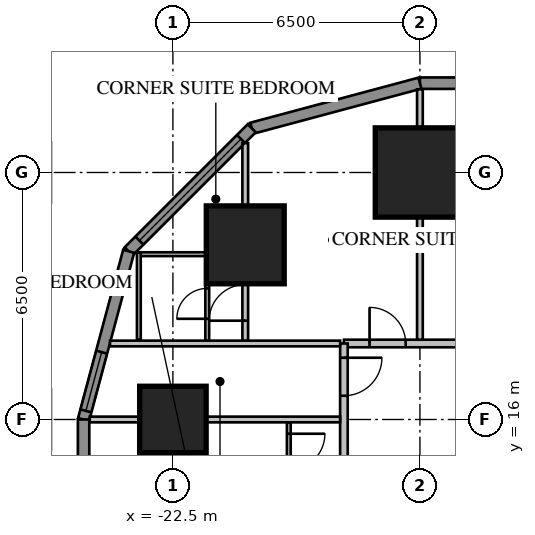
"""IFC4 building model, lengths in metres.
Left out: names, types, materials, properties, quantities, classifications, styles, units other than length and angle.
Written with IfcOpenShell. Run it as: python <this file> out.ifc"""

import sys

from ifc_helpers import new_model, si_unit, direction, frame, frame_2d, origin, origin_2d, place, context, subcontext, project, spatial, rectangle, extrude, element, fill, save


model = new_model("IFC4")
c1 = context("Model", 3, precision=1e-05, world=origin(), true_north=direction((0.0, 1.0)))
c2 = subcontext(c1, "Body", "Model", "MODEL_VIEW")
j1 = project(units=[si_unit("LENGTHUNIT", "METRE"), si_unit("PLANEANGLEUNIT", "RADIAN")], contexts=[c1])
p1 = place(None, origin())
s1 = spatial("IfcSite", under=j1, at=p1, CompositionType="ELEMENT")
p2 = place(p1, origin())
s2 = spatial("IfcBuilding", under=s1, at=p2, CompositionType="ELEMENT")
p3 = place(p2, frame((0.0, 0.0, 19.85)))
s3 = spatial("IfcBuildingStorey", under=s2, at=p3, CompositionType="ELEMENT", Elevation=19.85)
p4 = place(p3, frame((-16.0, 22.5, 0.0), z_axis=(0.0, 0.0, 1.0), x_axis=(1.0, 0.0, 0.0)))
e1 = element("IfcColumn", 1, at=p4, inside=s3, PredefinedType="COLUMN", context=c2, shape_type="SweptSolid", body=[
    extrude(rectangle(XDim=2.35, YDim=2.35, at=origin_2d()), origin(), (0.0, 0.0, 1.0), 3.85),
])
p5 = place(p3, frame((-20.596, 20.596, 0.0), z_axis=(0.0, 0.0, 1.0), x_axis=(1.0, 0.0, 0.0)))
e2 = element("IfcColumn", 2, at=p5, inside=s3, PredefinedType="COLUMN", context=c2, shape_type="SweptSolid", body=[
    extrude(rectangle(XDim=2.05, YDim=2.05, at=origin_2d()), origin(), (0.0, 0.0, 1.0), 3.85),
])
p6 = place(p3, frame((-22.5, 16.0, 0.0), z_axis=(0.0, 0.0, 1.0), x_axis=(1.0, 0.0, 0.0)))
e3 = element("IfcColumn", 3, at=p6, inside=s3, PredefinedType="COLUMN", context=c2, shape_type="SweptSolid", body=[
    extrude(rectangle(XDim=1.75, YDim=1.75, at=origin_2d()), origin(), (0.0, 0.0, 1.0), 3.85),
])
p7 = place(p3, frame((16.0, 24.85, 0.0), z_axis=(0.0, 0.0, 1.0), x_axis=(-1.0, 0.0, 0.0)))
e4 = element("IfcWall", 4, at=p7, inside=s3, PredefinedType="SOLIDWALL", context=c2, shape_type="SweptSolid", body=[
    extrude(rectangle(XDim=32.0, YDim=0.3, at=frame_2d((16.0, 0.0))), origin(), (0.0, 0.0, 1.0), 3.65),
])
p8 = place(p7, frame((1.2, 0.0, 0.75)))
e5 = element("IfcOpeningElement", 5, at=p8, cuts=e4, PredefinedType="OPENING", context=c2, shape_type="SweptSolid", body=[
    extrude(rectangle(XDim=1.6, YDim=1.8, at=frame_2d((0.8, 0.9))), frame((0.0, 0.17, 0.0), z_axis=(0.0, -1.0, 0.0), x_axis=(1.0, 0.0, 0.0)), (0.0, 0.0, 1.0), 0.34),
])
p9 = place(p7, frame((5.2, 0.0, 0.75)))
e6 = element("IfcOpeningElement", 6, at=p9, cuts=e4, PredefinedType="OPENING", context=c2, shape_type="SweptSolid", body=[
    extrude(rectangle(XDim=1.6, YDim=1.8, at=frame_2d((0.8, 0.9))), frame((0.0, 0.17, 0.0), z_axis=(0.0, -1.0, 0.0), x_axis=(1.0, 0.0, 0.0)), (0.0, 0.0, 1.0), 0.34),
])
p10 = place(p7, frame((17.2, 0.0, 0.75)))
e7 = element("IfcOpeningElement", 7, at=p10, cuts=e4, PredefinedType="OPENING", context=c2, shape_type="SweptSolid", body=[
    extrude(rectangle(XDim=1.6, YDim=1.8, at=frame_2d((0.8, 0.9))), frame((0.0, 0.17, 0.0), z_axis=(0.0, -1.0, 0.0), x_axis=(1.0, 0.0, 0.0)), (0.0, 0.0, 1.0), 0.34),
])
p11 = place(p7, frame((21.2, 0.0, 0.75)))
e8 = element("IfcOpeningElement", 8, at=p11, cuts=e4, PredefinedType="OPENING", context=c2, shape_type="SweptSolid", body=[
    extrude(rectangle(XDim=1.6, YDim=1.8, at=frame_2d((0.8, 0.9))), frame((0.0, 0.17, 0.0), z_axis=(0.0, -1.0, 0.0), x_axis=(1.0, 0.0, 0.0)), (0.0, 0.0, 1.0), 0.34),
])
p12 = place(p7, frame((25.2, 0.0, 0.75)))
e9 = element("IfcOpeningElement", 9, at=p12, cuts=e4, PredefinedType="OPENING", context=c2, shape_type="SweptSolid", body=[
    extrude(rectangle(XDim=1.6, YDim=1.8, at=frame_2d((0.8, 0.9))), frame((0.0, 0.17, 0.0), z_axis=(0.0, -1.0, 0.0), x_axis=(1.0, 0.0, 0.0)), (0.0, 0.0, 1.0), 0.34),
])
p13 = place(p7, frame((29.2, 0.0, 0.75)))
e10 = element("IfcOpeningElement", 10, at=p13, cuts=e4, PredefinedType="OPENING", context=c2, shape_type="SweptSolid", body=[
    extrude(rectangle(XDim=1.6, YDim=1.8, at=frame_2d((0.8, 0.9))), frame((0.0, 0.17, 0.0), z_axis=(0.0, -1.0, 0.0), x_axis=(1.0, 0.0, 0.0)), (0.0, 0.0, 1.0), 0.34),
])
p14 = place(p7, frame((8.8, 0.0, 0.75)))
e11 = element("IfcOpeningElement", 11, at=p14, cuts=e4, PredefinedType="OPENING", context=c2, shape_type="SweptSolid", body=[
    extrude(rectangle(XDim=2.4, YDim=1.8, at=frame_2d((1.2, 0.9))), frame((0.0, 0.17, 0.0), z_axis=(0.0, -1.0, 0.0), x_axis=(1.0, 0.0, 0.0)), (0.0, 0.0, 1.0), 0.34),
])
p15 = place(p7, frame((13.812, 0.0, 0.0)))
e12 = element("IfcOpeningElement", 12, at=p15, cuts=e4, PredefinedType="OPENING", context=c2, shape_type="SweptSolid", body=[
    extrude(rectangle(XDim=1.0, YDim=2.4, at=frame_2d((0.5, 1.2))), frame((0.0, 0.17, 0.0), z_axis=(0.0, -1.0, 0.0), x_axis=(1.0, 0.0, 0.0)), (0.0, 0.0, 1.0), 0.34),
])
p16 = place(p3, frame((-16.0, 24.85, 0.0), z_axis=(0.0, 0.0, 1.0), x_axis=(-0.965920218567, -0.258839972501, 0.0)))
e13 = element("IfcWall", 13, at=p16, inside=s3, PredefinedType="SOLIDWALL", context=c2, shape_type="SweptSolid", body=[
    extrude(rectangle(XDim=4.581, YDim=0.3, at=frame_2d((2.291, 0.0))), origin(), (0.0, 0.0, 1.0), 3.65),
])
p17 = place(p3, frame((-20.425, 23.664, 0.0), z_axis=(0.0, 0.0, 1.0), x_axis=(-0.707106781187, -0.707106781187, 0.0)))
e14 = element("IfcWall", 14, at=p17, inside=s3, PredefinedType="SOLIDWALL", context=c2, shape_type="SweptSolid", body=[
    extrude(rectangle(XDim=4.581, YDim=0.3, at=frame_2d((2.291, 0.0))), origin(), (0.0, 0.0, 1.0), 3.65),
])
p18 = place(p17, frame((0.4, 0.0, 0.75)))
e15 = element("IfcOpeningElement", 15, at=p18, cuts=e14, PredefinedType="OPENING", context=c2, shape_type="SweptSolid", body=[
    extrude(rectangle(XDim=3.781, YDim=1.8, at=frame_2d((1.891, 0.9))), frame((0.0, 0.17, 0.0), z_axis=(0.0, -1.0, 0.0), x_axis=(1.0, 0.0, 0.0)), (0.0, 0.0, 1.0), 0.34),
])
p19 = place(p3, frame((-23.664, 20.425, 0.0), z_axis=(0.0, 0.0, 1.0), x_axis=(-0.258839972501, -0.965920218567, 0.0)))
e16 = element("IfcWall", 16, at=p19, inside=s3, PredefinedType="SOLIDWALL", context=c2, shape_type="SweptSolid", body=[
    extrude(rectangle(XDim=4.581, YDim=0.3, at=frame_2d((2.291, 0.0))), origin(), (0.0, 0.0, 1.0), 3.65),
])
p20 = place(p19, frame((2.746, 0.0, 0.75)))
e17 = element("IfcOpeningElement", 17, at=p20, cuts=e16, PredefinedType="OPENING", context=c2, shape_type="SweptSolid", body=[
    extrude(rectangle(XDim=1.6, YDim=1.8, at=frame_2d((0.8, 0.9))), frame((0.0, 0.17, 0.0), z_axis=(0.0, -1.0, 0.0), x_axis=(1.0, 0.0, 0.0)), (0.0, 0.0, 1.0), 0.34),
])
p21 = place(p3, frame((-24.85, 16.0, 0.0), z_axis=(0.0, 0.0, 1.0), x_axis=(0.0, -1.0, 0.0)))
e18 = element("IfcWall", 18, at=p21, inside=s3, PredefinedType="SOLIDWALL", context=c2, shape_type="SweptSolid", body=[
    extrude(rectangle(XDim=32.0, YDim=0.3, at=frame_2d((16.0, 0.0))), origin(), (0.0, 0.0, 1.0), 3.65),
])
p22 = place(p21, frame((1.2, 0.0, 0.75)))
e19 = element("IfcOpeningElement", 19, at=p22, cuts=e18, PredefinedType="OPENING", context=c2, shape_type="SweptSolid", body=[
    extrude(rectangle(XDim=1.6, YDim=1.8, at=frame_2d((0.8, 0.9))), frame((0.0, 0.17, 0.0), z_axis=(0.0, -1.0, 0.0), x_axis=(1.0, 0.0, 0.0)), (0.0, 0.0, 1.0), 0.34),
])
p23 = place(p21, frame((5.2, 0.0, 0.75)))
e20 = element("IfcOpeningElement", 20, at=p23, cuts=e18, PredefinedType="OPENING", context=c2, shape_type="SweptSolid", body=[
    extrude(rectangle(XDim=1.6, YDim=1.8, at=frame_2d((0.8, 0.9))), frame((0.0, 0.17, 0.0), z_axis=(0.0, -1.0, 0.0), x_axis=(1.0, 0.0, 0.0)), (0.0, 0.0, 1.0), 0.34),
])
p24 = place(p21, frame((17.2, 0.0, 0.75)))
e21 = element("IfcOpeningElement", 21, at=p24, cuts=e18, PredefinedType="OPENING", context=c2, shape_type="SweptSolid", body=[
    extrude(rectangle(XDim=1.6, YDim=1.8, at=frame_2d((0.8, 0.9))), frame((0.0, 0.17, 0.0), z_axis=(0.0, -1.0, 0.0), x_axis=(1.0, 0.0, 0.0)), (0.0, 0.0, 1.0), 0.34),
])
p25 = place(p21, frame((21.2, 0.0, 0.75)))
e22 = element("IfcOpeningElement", 22, at=p25, cuts=e18, PredefinedType="OPENING", context=c2, shape_type="SweptSolid", body=[
    extrude(rectangle(XDim=1.6, YDim=1.8, at=frame_2d((0.8, 0.9))), frame((0.0, 0.17, 0.0), z_axis=(0.0, -1.0, 0.0), x_axis=(1.0, 0.0, 0.0)), (0.0, 0.0, 1.0), 0.34),
])
p26 = place(p21, frame((25.2, 0.0, 0.75)))
e23 = element("IfcOpeningElement", 23, at=p26, cuts=e18, PredefinedType="OPENING", context=c2, shape_type="SweptSolid", body=[
    extrude(rectangle(XDim=1.6, YDim=1.8, at=frame_2d((0.8, 0.9))), frame((0.0, 0.17, 0.0), z_axis=(0.0, -1.0, 0.0), x_axis=(1.0, 0.0, 0.0)), (0.0, 0.0, 1.0), 0.34),
])
p27 = place(p21, frame((29.2, 0.0, 0.75)))
e24 = element("IfcOpeningElement", 24, at=p27, cuts=e18, PredefinedType="OPENING", context=c2, shape_type="SweptSolid", body=[
    extrude(rectangle(XDim=1.6, YDim=1.8, at=frame_2d((0.8, 0.9))), frame((0.0, 0.17, 0.0), z_axis=(0.0, -1.0, 0.0), x_axis=(1.0, 0.0, 0.0)), (0.0, 0.0, 1.0), 0.34),
])
p28 = place(p21, frame((8.8, 0.0, 0.75)))
e25 = element("IfcOpeningElement", 25, at=p28, cuts=e18, PredefinedType="OPENING", context=c2, shape_type="SweptSolid", body=[
    extrude(rectangle(XDim=2.4, YDim=1.8, at=frame_2d((1.2, 0.9))), frame((0.0, 0.17, 0.0), z_axis=(0.0, -1.0, 0.0), x_axis=(1.0, 0.0, 0.0)), (0.0, 0.0, 1.0), 0.34),
])
p29 = place(p21, frame((13.812, 0.0, 0.0)))
e26 = element("IfcOpeningElement", 26, at=p29, cuts=e18, PredefinedType="OPENING", context=c2, shape_type="SweptSolid", body=[
    extrude(rectangle(XDim=1.0, YDim=2.4, at=frame_2d((0.5, 1.2))), frame((0.0, 0.17, 0.0), z_axis=(0.0, -1.0, 0.0), x_axis=(1.0, 0.0, 0.0)), (0.0, 0.0, 1.0), 0.34),
])
p30 = place(p3, frame((18.0, 18.0, 0.0), z_axis=(0.0, 0.0, 1.0), x_axis=(-1.0, 0.0, 0.0)))
e27 = element("IfcWall", 27, at=p30, inside=s3, PredefinedType="PARTITIONING", context=c2, shape_type="SweptSolid", body=[
    extrude(rectangle(XDim=36.0, YDim=0.2, at=frame_2d((18.0, 0.0))), origin(), (0.0, 0.0, 1.0), 3.65),
])
p31 = place(p30, frame((0.375, 0.0, 0.0)))
e28 = element("IfcOpeningElement", 28, at=p31, cuts=e27, PredefinedType="OPENING", context=c2, shape_type="SweptSolid", body=[
    extrude(rectangle(XDim=1.0, YDim=2.1, at=frame_2d((0.5, 1.05))), frame((0.0, 0.12, 0.0), z_axis=(0.0, -1.0, 0.0), x_axis=(1.0, 0.0, 0.0)), (0.0, 0.0, 1.0), 0.24),
])
p32 = place(p30, frame((3.8, 0.0, 0.0)))
e29 = element("IfcOpeningElement", 29, at=p32, cuts=e27, PredefinedType="OPENING", context=c2, shape_type="SweptSolid", body=[
    extrude(rectangle(XDim=0.95, YDim=2.1, at=frame_2d((0.475, 1.05))), frame((0.0, 0.12, 0.0), z_axis=(0.0, -1.0, 0.0), x_axis=(1.0, 0.0, 0.0)), (0.0, 0.0, 1.0), 0.24),
])
p33 = place(p30, frame((7.8, 0.0, 0.0)))
e30 = element("IfcOpeningElement", 30, at=p33, cuts=e27, PredefinedType="OPENING", context=c2, shape_type="SweptSolid", body=[
    extrude(rectangle(XDim=0.95, YDim=2.1, at=frame_2d((0.475, 1.05))), frame((0.0, 0.12, 0.0), z_axis=(0.0, -1.0, 0.0), x_axis=(1.0, 0.0, 0.0)), (0.0, 0.0, 1.0), 0.24),
])
p34 = place(p30, frame((19.8, 0.0, 0.0)))
e31 = element("IfcOpeningElement", 31, at=p34, cuts=e27, PredefinedType="OPENING", context=c2, shape_type="SweptSolid", body=[
    extrude(rectangle(XDim=0.95, YDim=2.1, at=frame_2d((0.475, 1.05))), frame((0.0, 0.12, 0.0), z_axis=(0.0, -1.0, 0.0), x_axis=(1.0, 0.0, 0.0)), (0.0, 0.0, 1.0), 0.24),
])
p35 = place(p30, frame((23.8, 0.0, 0.0)))
e32 = element("IfcOpeningElement", 32, at=p35, cuts=e27, PredefinedType="OPENING", context=c2, shape_type="SweptSolid", body=[
    extrude(rectangle(XDim=0.95, YDim=2.1, at=frame_2d((0.475, 1.05))), frame((0.0, 0.12, 0.0), z_axis=(0.0, -1.0, 0.0), x_axis=(1.0, 0.0, 0.0)), (0.0, 0.0, 1.0), 0.24),
])
p36 = place(p30, frame((27.8, 0.0, 0.0)))
e33 = element("IfcOpeningElement", 33, at=p36, cuts=e27, PredefinedType="OPENING", context=c2, shape_type="SweptSolid", body=[
    extrude(rectangle(XDim=0.95, YDim=2.1, at=frame_2d((0.475, 1.05))), frame((0.0, 0.12, 0.0), z_axis=(0.0, -1.0, 0.0), x_axis=(1.0, 0.0, 0.0)), (0.0, 0.0, 1.0), 0.24),
])
p37 = place(p30, frame((31.8, 0.0, 0.0)))
e34 = element("IfcOpeningElement", 34, at=p37, cuts=e27, PredefinedType="OPENING", context=c2, shape_type="SweptSolid", body=[
    extrude(rectangle(XDim=0.95, YDim=2.1, at=frame_2d((0.475, 1.05))), frame((0.0, 0.12, 0.0), z_axis=(0.0, -1.0, 0.0), x_axis=(1.0, 0.0, 0.0)), (0.0, 0.0, 1.0), 0.24),
])
p38 = place(p30, frame((34.375, 0.0, 0.0)))
e35 = element("IfcOpeningElement", 35, at=p38, cuts=e27, PredefinedType="OPENING", context=c2, shape_type="SweptSolid", body=[
    extrude(rectangle(XDim=0.95, YDim=2.1, at=frame_2d((0.475, 1.05))), frame((0.0, 0.12, 0.0), z_axis=(0.0, -1.0, 0.0), x_axis=(1.0, 0.0, 0.0)), (0.0, 0.0, 1.0), 0.24),
])
p39 = place(p30, frame((11.2, 0.0, 0.0)))
e36 = element("IfcOpeningElement", 36, at=p39, cuts=e27, PredefinedType="OPENING", context=c2, shape_type="SweptSolid", body=[
    extrude(rectangle(XDim=1.0, YDim=2.1, at=frame_2d((0.5, 1.05))), frame((0.0, 0.12, 0.0), z_axis=(0.0, -1.0, 0.0), x_axis=(1.0, 0.0, 0.0)), (0.0, 0.0, 1.0), 0.24),
])
p40 = place(p3, frame((-16.0, 18.1, 0.0), z_axis=(0.0, 0.0, 1.0), x_axis=(0.0, 1.0, 0.0)))
e37 = element("IfcWall", 37, at=p40, inside=s3, PredefinedType="PARTITIONING", context=c2, shape_type="SweptSolid", body=[
    extrude(rectangle(XDim=6.589, YDim=0.15, at=frame_2d((3.295, 0.0))), origin(), (0.0, 0.0, 1.0), 3.65),
])
p41 = place(p3, frame((-21.596, 18.065, 0.0), z_axis=(0.0, 0.0, 1.0), x_axis=(0.0, 1.0, 0.0)))
e38 = element("IfcWall", 38, at=p41, inside=s3, PredefinedType="PARTITIONING", context=c2, shape_type="SweptSolid", body=[
    extrude(rectangle(XDim=2.335, YDim=0.1, at=frame_2d((1.167, 0.0))), origin(), (0.0, 0.0, 1.0), 3.65),
])
p42 = place(p41, frame((0.585, 0.0, 0.0)))
e39 = element("IfcOpeningElement", 39, at=p42, cuts=e38, PredefinedType="OPENING", context=c2, shape_type="SweptSolid", body=[
    extrude(rectangle(XDim=0.8, YDim=2.1, at=frame_2d((0.4, 1.05))), frame((0.0, 0.07, 0.0), z_axis=(0.0, -1.0, 0.0), x_axis=(1.0, 0.0, 0.0)), (0.0, 0.0, 1.0), 0.14),
])
p43 = place(p3, frame((-21.646, 20.35, 0.0), z_axis=(0.0, 0.0, 1.0), x_axis=(-1.0, 0.0, 0.0)))
e40 = element("IfcWall", 40, at=p43, inside=s3, PredefinedType="PARTITIONING", context=c2, shape_type="SweptSolid", body=[
    extrude(rectangle(XDim=1.7, YDim=0.1, at=frame_2d((0.85, 0.0))), origin(), (0.0, 0.0, 1.0), 3.65),
])
p44 = place(p3, frame((-23.396, 18.1, 0.0), z_axis=(0.0, 0.0, 1.0), x_axis=(0.0, 1.0, 0.0)))
e41 = element("IfcWall", 41, at=p44, inside=s3, PredefinedType="PARTITIONING", context=c2, shape_type="SweptSolid", body=[
    extrude(rectangle(XDim=2.3, YDim=0.1, at=frame_2d((1.15, 0.0))), origin(), (0.0, 0.0, 1.0), 3.65),
])
p45 = place(p3, frame((-20.596, 18.065, 0.0), z_axis=(0.0, 0.0, 1.0), x_axis=(0.0, 1.0, 0.0)))
e42 = element("IfcWall", 42, at=p45, inside=s3, PredefinedType="PARTITIONING", context=c2, shape_type="SweptSolid", body=[
    extrude(rectangle(XDim=5.209, YDim=0.15, at=frame_2d((2.604, 0.0))), origin(), (0.0, 0.0, 1.0), 3.65),
])
p46 = place(p45, frame((0.535, 0.0, 0.0)))
e43 = element("IfcOpeningElement", 43, at=p46, cuts=e42, PredefinedType="OPENING", context=c2, shape_type="SweptSolid", body=[
    extrude(rectangle(XDim=0.95, YDim=2.1, at=frame_2d((0.475, 1.05))), frame((0.0, 0.095, 0.0), z_axis=(0.0, -1.0, 0.0), x_axis=(1.0, 0.0, 0.0)), (0.0, 0.0, 1.0), 0.19),
])
p47 = place(p3, frame((-18.0, 18.0, 0.0), z_axis=(0.0, 0.0, 1.0), x_axis=(0.0, -1.0, 0.0)))
e44 = element("IfcWall", 44, at=p47, inside=s3, PredefinedType="PARTITIONING", context=c2, shape_type="SweptSolid", body=[
    extrude(rectangle(XDim=36.0, YDim=0.2, at=frame_2d((18.0, 0.0))), origin(), (0.0, 0.0, 1.0), 3.65),
])
p48 = place(p47, frame((10.4, 0.0, 0.0)))
e45 = element("IfcOpeningElement", 45, at=p48, cuts=e44, PredefinedType="OPENING", context=c2, shape_type="SweptSolid", body=[
    extrude(rectangle(XDim=1.0, YDim=2.1, at=frame_2d((0.5, 1.05))), frame((0.0, 0.12, 0.0), z_axis=(0.0, -1.0, 0.0), x_axis=(1.0, 0.0, 0.0)), (0.0, 0.0, 1.0), 0.24),
])
p49 = place(p47, frame((14.4, 0.0, 0.0)))
e46 = element("IfcOpeningElement", 46, at=p49, cuts=e44, PredefinedType="OPENING", context=c2, shape_type="SweptSolid", body=[
    extrude(rectangle(XDim=1.0, YDim=2.1, at=frame_2d((0.5, 1.05))), frame((0.0, 0.12, 0.0), z_axis=(0.0, -1.0, 0.0), x_axis=(1.0, 0.0, 0.0)), (0.0, 0.0, 1.0), 0.24),
])
p50 = place(p47, frame((0.375, 0.0, 0.0)))
e47 = element("IfcOpeningElement", 47, at=p50, cuts=e44, PredefinedType="OPENING", context=c2, shape_type="SweptSolid", body=[
    extrude(rectangle(XDim=1.0, YDim=2.1, at=frame_2d((0.5, 1.05))), frame((0.0, 0.12, 0.0), z_axis=(0.0, -1.0, 0.0), x_axis=(1.0, 0.0, 0.0)), (0.0, 0.0, 1.0), 0.24),
])
p51 = place(p47, frame((34.375, 0.0, 0.0)))
e48 = element("IfcOpeningElement", 48, at=p51, cuts=e44, PredefinedType="OPENING", context=c2, shape_type="SweptSolid", body=[
    extrude(rectangle(XDim=0.95, YDim=2.1, at=frame_2d((0.475, 1.05))), frame((0.0, 0.12, 0.0), z_axis=(0.0, -1.0, 0.0), x_axis=(1.0, 0.0, 0.0)), (0.0, 0.0, 1.0), 0.24),
])
p52 = place(p3, frame((-19.45, 15.925, 0.0), z_axis=(0.0, 0.0, 1.0), x_axis=(0.0, -1.0, 0.0)))
e49 = element("IfcWall", 49, at=p52, inside=s3, PredefinedType="PARTITIONING", context=c2, shape_type="SweptSolid", body=[
    extrude(rectangle(XDim=11.85, YDim=0.1, at=frame_2d((5.925, 0.0))), origin(), (0.0, 0.0, 1.0), 3.65),
])
p53 = place(p52, frame((10.125, 0.0, 0.0)))
e50 = element("IfcOpeningElement", 50, at=p53, cuts=e49, PredefinedType="OPENING", context=c2, shape_type="SweptSolid", body=[
    extrude(rectangle(XDim=1.0, YDim=2.1, at=frame_2d((0.5, 1.05))), frame((0.0, 0.07, 0.0), z_axis=(0.0, -1.0, 0.0), x_axis=(1.0, 0.0, 0.0)), (0.0, 0.0, 1.0), 0.14),
])
p54 = place(p52, frame((8.3, 0.0, 0.0)))
e51 = element("IfcOpeningElement", 51, at=p54, cuts=e49, PredefinedType="OPENING", context=c2, shape_type="SweptSolid", body=[
    extrude(rectangle(XDim=0.8, YDim=2.1, at=frame_2d((0.4, 1.05))), frame((0.0, 0.07, 0.0), z_axis=(0.0, -1.0, 0.0), x_axis=(1.0, 0.0, 0.0)), (0.0, 0.0, 1.0), 0.14),
])
p55 = place(p52, frame((0.3, 0.0, 0.0)))
e52 = element("IfcOpeningElement", 52, at=p55, cuts=e49, PredefinedType="OPENING", context=c2, shape_type="SweptSolid", body=[
    extrude(rectangle(XDim=0.95, YDim=2.1, at=frame_2d((0.475, 1.05))), frame((0.0, 0.07, 0.0), z_axis=(0.0, -1.0, 0.0), x_axis=(1.0, 0.0, 0.0)), (0.0, 0.0, 1.0), 0.14),
])
p56 = place(p52, frame((4.3, 0.0, 0.0)))
e53 = element("IfcOpeningElement", 53, at=p56, cuts=e49, PredefinedType="OPENING", context=c2, shape_type="SweptSolid", body=[
    extrude(rectangle(XDim=0.95, YDim=2.1, at=frame_2d((0.475, 1.05))), frame((0.0, 0.07, 0.0), z_axis=(0.0, -1.0, 0.0), x_axis=(1.0, 0.0, 0.0)), (0.0, 0.0, 1.0), 0.14),
])
p57 = place(p3, frame((-18.1, 18.0, 0.0), z_axis=(0.0, 0.0, 1.0), x_axis=(-1.0, 0.0, 0.0)))
e54 = element("IfcWall", 54, at=p57, inside=s3, PredefinedType="PARTITIONING", context=c2, shape_type="SweptSolid", body=[
    extrude(rectangle(XDim=6.053, YDim=0.15, at=frame_2d((3.027, 0.0))), origin(), (0.0, 0.0, 1.0), 3.65),
])
p58 = place(p3, frame((-18.1, 16.0, 0.0), z_axis=(0.0, 0.0, 1.0), x_axis=(-1.0, 0.0, 0.0)))
e55 = element("IfcWall", 55, at=p58, inside=s3, PredefinedType="PARTITIONING", context=c2, shape_type="SweptSolid", body=[
    extrude(rectangle(XDim=6.589, YDim=0.15, at=frame_2d((3.295, 0.0))), origin(), (0.0, 0.0, 1.0), 3.65),
])
p59 = place(p3, frame((-13.625, 20.75, 0.0), z_axis=(0.0, 0.0, 1.0), x_axis=(-1.0, 0.0, 0.0)))
e56 = element("IfcWall", 56, at=p59, inside=s3, PredefinedType="PARTITIONING", context=c2, shape_type="SweptSolid", body=[
    extrude(rectangle(XDim=2.3, YDim=0.1, at=frame_2d((1.15, 0.0))), origin(), (0.0, 0.0, 1.0), 3.65),
])
p60 = place(p59, frame((0.2, 0.0, 0.0)))
e57 = element("IfcOpeningElement", 57, at=p60, cuts=e56, PredefinedType="OPENING", context=c2, shape_type="SweptSolid", body=[
    extrude(rectangle(XDim=0.9, YDim=2.1, at=frame_2d((0.45, 1.05))), frame((0.0, 0.07, 0.0), z_axis=(0.0, -1.0, 0.0), x_axis=(1.0, 0.0, 0.0)), (0.0, 0.0, 1.0), 0.14),
])
p61 = place(p18, origin())
e58 = element("IfcWindow", 58, at=p61, inside=s3, PartitioningType="SINGLE_PANEL", PredefinedType="WINDOW", context=c2, shape_type="SweptSolid", body=[
    extrude(rectangle(XDim=3.781, YDim=1.8, at=frame_2d((1.891, 0.9))), frame((0.0, 0.03, 0.0), z_axis=(0.0, -1.0, 0.0), x_axis=(1.0, 0.0, 0.0)), (0.0, 0.0, 1.0), 0.06),
])
fill(e15, e58)
p62 = place(p20, origin())
e59 = element("IfcWindow", 59, at=p62, inside=s3, PartitioningType="SINGLE_PANEL", PredefinedType="WINDOW", context=c2, shape_type="SweptSolid", body=[
    extrude(rectangle(XDim=1.6, YDim=1.8, at=frame_2d((0.8, 0.9))), frame((0.0, 0.03, 0.0), z_axis=(0.0, -1.0, 0.0), x_axis=(1.0, 0.0, 0.0)), (0.0, 0.0, 1.0), 0.06),
])
fill(e17, e59)
p63 = place(p38, origin())
e60 = element("IfcDoor", 60, at=p63, inside=s3, OperationType="SINGLE_SWING_RIGHT", PredefinedType="DOOR", context=c2, shape_type="SweptSolid", body=[
    extrude(rectangle(XDim=0.95, YDim=2.1, at=frame_2d((0.475, 1.05))), frame((0.0, 0.025, 0.0), z_axis=(0.0, -1.0, 0.0), x_axis=(1.0, 0.0, 0.0)), (0.0, 0.0, 1.0), 0.05),
])
fill(e35, e60)
p64 = place(p42, origin())
e61 = element("IfcDoor", 61, at=p64, inside=s3, OperationType="SINGLE_SWING_LEFT", PredefinedType="DOOR", context=c2, shape_type="SweptSolid", body=[
    extrude(rectangle(XDim=0.8, YDim=2.1, at=frame_2d((0.4, 1.05))), frame((0.0, 0.025, 0.0), z_axis=(0.0, -1.0, 0.0), x_axis=(1.0, 0.0, 0.0)), (0.0, 0.0, 1.0), 0.05),
])
fill(e39, e61)
p65 = place(p46, origin())
e62 = element("IfcDoor", 62, at=p65, inside=s3, OperationType="SINGLE_SWING_LEFT", PredefinedType="DOOR", context=c2, shape_type="SweptSolid", body=[
    extrude(rectangle(XDim=0.95, YDim=2.1, at=frame_2d((0.475, 1.05))), frame((0.0, 0.025, 0.0), z_axis=(0.0, -1.0, 0.0), x_axis=(1.0, 0.0, 0.0)), (0.0, 0.0, 1.0), 0.05),
])
fill(e43, e62)
p66 = place(p50, origin())
e63 = element("IfcDoor", 63, at=p66, inside=s3, OperationType="SINGLE_SWING_LEFT", PredefinedType="DOOR", context=c2, shape_type="SweptSolid", body=[
    extrude(rectangle(XDim=1.0, YDim=2.1, at=frame_2d((0.5, 1.05))), frame((0.0, 0.025, 0.0), z_axis=(0.0, -1.0, 0.0), x_axis=(1.0, 0.0, 0.0)), (0.0, 0.0, 1.0), 0.05),
])
fill(e47, e63)
p67 = place(p55, origin())
e64 = element("IfcDoor", 64, at=p67, inside=s3, OperationType="SINGLE_SWING_LEFT", PredefinedType="DOOR", context=c2, shape_type="SweptSolid", body=[
    extrude(rectangle(XDim=0.95, YDim=2.1, at=frame_2d((0.475, 1.05))), frame((0.0, 0.025, 0.0), z_axis=(0.0, -1.0, 0.0), x_axis=(1.0, 0.0, 0.0)), (0.0, 0.0, 1.0), 0.05),
])
fill(e52, e64)
save(model, sys.argv[1])
